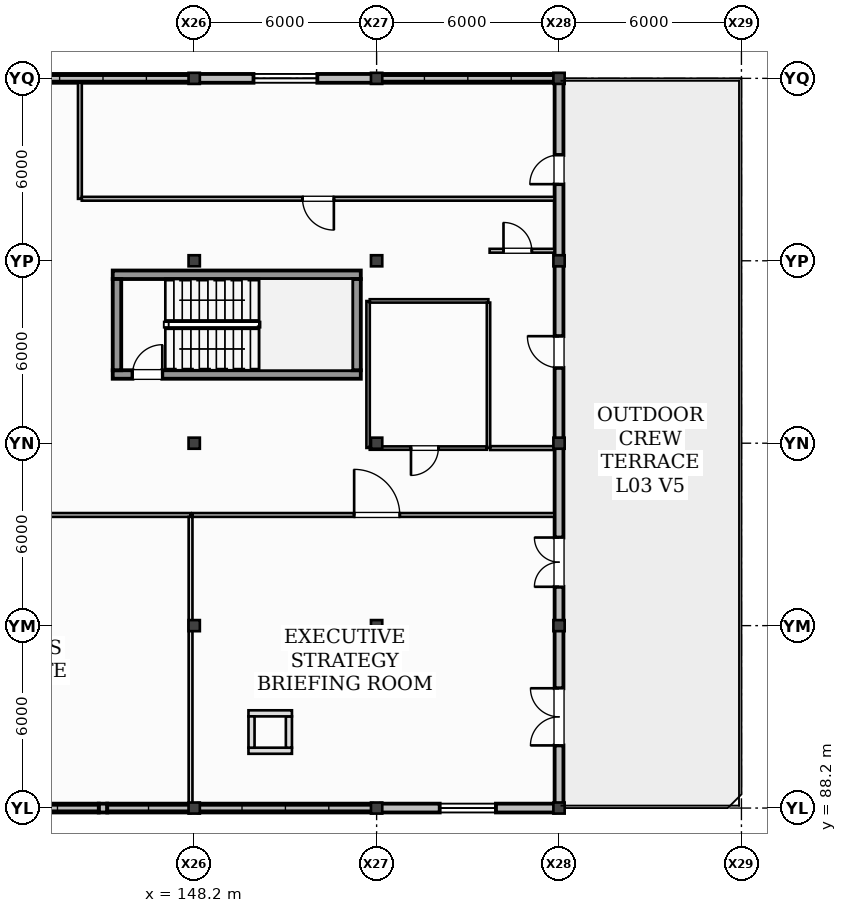
"""IFC4 building model, lengths in metres.
Left out: names, types, materials, properties, quantities, classifications, styles, units other than length and angle.
Written with IfcOpenShell. Run it as: python <this file> out.ifc"""

import sys

from ifc_helpers import new_model, si_unit, direction, frame, frame_2d, origin, origin_2d, place, context, subcontext, project, spatial, rectangle, i_section, extrude, element, fill, save


model = new_model("IFC4")
c1 = context("Model", 3, precision=1e-05, world=origin(), true_north=direction((0.0, 1.0)))
c2 = subcontext(c1, "Body", "Model", "MODEL_VIEW")
j1 = project(units=[si_unit("LENGTHUNIT", "METRE"), si_unit("PLANEANGLEUNIT", "RADIAN")], contexts=[c1])
p1 = place(None, origin())
s1 = spatial("IfcSite", under=j1, at=p1, CompositionType="ELEMENT")
p2 = place(p1, origin())
s2 = spatial("IfcBuilding", under=s1, at=p2, CompositionType="ELEMENT")
p3 = place(p2, frame((0.0, 0.0, 10.0)))
s3 = spatial("IfcBuildingStorey", under=s2, at=p3, CompositionType="ELEMENT", Elevation=10.0)
for number, where, z_axis, x_axis in (
    (1, (148.2, 88.2, 0.0), (0.0, 0.0, 1.0), (1.0, 0.0, 0.0)),
    (2, (148.2, 94.2, 0.0), (0.0, 0.0, 1.0), (1.0, 0.0, 0.0)),
    (3, (148.2, 100.2, 0.0), (0.0, 0.0, 1.0), (1.0, 0.0, 0.0)),
    (4, (148.2, 106.2, 0.0), (0.0, 0.0, 1.0), (1.0, 0.0, 0.0)),
    (5, (148.2, 112.2, 0.0), (0.0, 0.0, 1.0), (1.0, 0.0, 0.0)),
    (6, (154.2, 88.2, 0.0), (0.0, 0.0, 1.0), (1.0, 0.0, 0.0)),
    (7, (154.2, 94.2, 0.0), (0.0, 0.0, 1.0), (1.0, 0.0, 0.0)),
    (8, (154.2, 100.2, 0.0), (0.0, 0.0, 1.0), (1.0, 0.0, 0.0)),
    (9, (154.2, 106.2, 0.0), (0.0, 0.0, 1.0), (1.0, 0.0, 0.0)),
    (10, (154.2, 112.2, 0.0), (0.0, 0.0, 1.0), (1.0, 0.0, 0.0)),
    (11, (160.2, 88.2, 0.0), (0.0, 0.0, 1.0), (1.0, 0.0, 0.0)),
    (12, (160.2, 94.2, 0.0), (0.0, 0.0, 1.0), (1.0, 0.0, 0.0)),
    (13, (160.2, 100.2, 0.0), (0.0, 0.0, 1.0), (1.0, 0.0, 0.0)),
    (14, (160.2, 106.2, 0.0), (0.0, 0.0, 1.0), (1.0, 0.0, 0.0)),
    (15, (160.2, 112.2, 0.0), (0.0, 0.0, 1.0), (1.0, 0.0, 0.0)),
):
    element("IfcColumn", number, at=place(p3, frame(where, z_axis=z_axis, x_axis=x_axis)), inside=s3, PredefinedType="COLUMN", context=c2, shape_type="SweptSolid", body=[
        extrude(i_section(OverallWidth=0.371, OverallDepth=0.364, WebThickness=0.013, FlangeThickness=0.022, at=origin_2d()), origin(), (0.0, 0.0, 1.0), 4.0),
    ])
p4 = place(p3, frame((145.06, 88.2, 0.0), z_axis=(0.0, 0.0, 1.0), x_axis=(1.0, 0.0, 0.0)))
e16 = element("IfcWall", 16, at=p4, inside=s3, PredefinedType="STANDARD", context=c2, shape_type="SweptSolid", body=[
    extrude(rectangle(XDim=0.28, YDim=0.29, at=frame_2d((0.14, 0.0))), origin(), (0.0, 0.0, 1.0), 3.249),
])
p5 = place(p3, frame((142.345, 88.2, 0.0), z_axis=(0.0, 0.0, 1.0), x_axis=(1.0, 0.0, 0.0)))
e17 = element("IfcWall", 17, at=p5, inside=s3, PredefinedType="STANDARD", context=c2, shape_type="SweptSolid", body=[
    extrude(rectangle(XDim=2.715, YDim=0.29, at=frame_2d((1.357, 0.0))), origin(), (0.0, 0.0, 1.0), 0.68),
])
p6 = place(p3, frame((145.34, 88.2, 0.0), z_axis=(0.0, 0.0, 1.0), x_axis=(1.0, 0.0, 0.0)))
e18 = element("IfcWall", 18, at=p6, inside=s3, PredefinedType="STANDARD", context=c2, shape_type="SweptSolid", body=[
    extrude(rectangle(XDim=2.715, YDim=0.29, at=frame_2d((1.357, 0.0))), origin(), (0.0, 0.0, 1.0), 0.8),
])
p7 = place(p3, frame((148.345, 88.2, 0.0), z_axis=(0.0, 0.0, 1.0), x_axis=(1.0, 0.0, 0.0)))
e19 = element("IfcWall", 19, at=p7, inside=s3, PredefinedType="STANDARD", context=c2, shape_type="SweptSolid", body=[
    extrude(rectangle(XDim=5.71, YDim=0.29, at=frame_2d((2.855, 0.0))), origin(), (0.0, 0.0, 1.0), 0.92),
])
p8 = place(p3, frame((154.345, 88.2, 0.0), z_axis=(0.0, 0.0, 1.0), x_axis=(1.0, 0.0, 0.0)))
e20 = element("IfcWall", 20, at=p8, inside=s3, PredefinedType="STANDARD", context=c2, shape_type="SweptSolid", body=[
    extrude(rectangle(XDim=5.71, YDim=0.29, at=frame_2d((2.855, 0.0))), origin(), (0.0, 0.0, 1.0), 3.299),
])
p9 = place(p8, frame((1.93, 0.0, 1.0)))
e21 = element("IfcOpeningElement", 21, at=p9, cuts=e20, PredefinedType="OPENING", context=c2, shape_type="SweptSolid", body=[
    extrude(rectangle(XDim=1.85, YDim=1.55, at=frame_2d((0.925, 0.775))), frame((0.0, 0.155, 0.0), z_axis=(0.0, -1.0, 0.0), x_axis=(1.0, 0.0, 0.0)), (0.0, 0.0, 1.0), 0.31),
])
p10 = place(p3, frame((148.055, 112.2, 0.0), z_axis=(0.0, 0.0, 1.0), x_axis=(-1.0, 0.0, 0.0)))
e22 = element("IfcWall", 22, at=p10, inside=s3, PredefinedType="STANDARD", context=c2, shape_type="SweptSolid", body=[
    extrude(rectangle(XDim=5.71, YDim=0.29, at=frame_2d((2.855, 0.0))), origin(), (0.0, 0.0, 1.0), 0.68),
])
p11 = place(p3, frame((154.055, 112.2, 0.0), z_axis=(0.0, 0.0, 1.0), x_axis=(-1.0, 0.0, 0.0)))
e23 = element("IfcWall", 23, at=p11, inside=s3, PredefinedType="STANDARD", context=c2, shape_type="SweptSolid", body=[
    extrude(rectangle(XDim=5.71, YDim=0.29, at=frame_2d((2.855, 0.0))), origin(), (0.0, 0.0, 1.0), 3.249),
])
p12 = place(p11, frame((1.805, 0.0, 1.0)))
e24 = element("IfcOpeningElement", 24, at=p12, cuts=e23, PredefinedType="OPENING", context=c2, shape_type="SweptSolid", body=[
    extrude(rectangle(XDim=2.1, YDim=1.55, at=frame_2d((1.05, 0.775))), frame((0.0, 0.155, 0.0), z_axis=(0.0, -1.0, 0.0), x_axis=(1.0, 0.0, 0.0)), (0.0, 0.0, 1.0), 0.31),
])
p13 = place(p3, frame((160.055, 112.2, 0.0), z_axis=(0.0, 0.0, 1.0), x_axis=(-1.0, 0.0, 0.0)))
e25 = element("IfcWall", 25, at=p13, inside=s3, PredefinedType="STANDARD", context=c2, shape_type="SweptSolid", body=[
    extrude(rectangle(XDim=5.71, YDim=0.29, at=frame_2d((2.855, 0.0))), origin(), (0.0, 0.0, 1.0), 0.8),
])
p14 = place(p3, frame((160.2, 88.345, 0.0), z_axis=(0.0, 0.0, 1.0), x_axis=(0.0, 1.0, 0.0)))
e26 = element("IfcWall", 26, at=p14, inside=s3, PredefinedType="STANDARD", context=c2, shape_type="SweptSolid", body=[
    extrude(rectangle(XDim=5.71, YDim=0.29, at=frame_2d((2.855, 0.0))), origin(), (0.0, 0.0, 1.0), 3.303),
])
p15 = place(p14, frame((1.915, 0.0, 0.0)))
e27 = element("IfcOpeningElement", 27, at=p15, cuts=e26, PredefinedType="OPENING", context=c2, shape_type="SweptSolid", body=[
    extrude(rectangle(XDim=1.88, YDim=2.28, at=frame_2d((0.94, 1.14))), frame((0.0, 0.155, 0.0), z_axis=(0.0, -1.0, 0.0), x_axis=(1.0, 0.0, 0.0)), (0.0, 0.0, 1.0), 0.31),
])
p16 = place(p3, frame((160.2, 94.345, 0.0), z_axis=(0.0, 0.0, 1.0), x_axis=(0.0, 1.0, 0.0)))
e28 = element("IfcWall", 28, at=p16, inside=s3, PredefinedType="STANDARD", context=c2, shape_type="SweptSolid", body=[
    extrude(rectangle(XDim=5.71, YDim=0.29, at=frame_2d((2.855, 0.0))), origin(), (0.0, 0.0, 1.0), 3.303),
])
p17 = place(p16, frame((1.133, 0.0, 0.0)))
e29 = element("IfcOpeningElement", 29, at=p17, cuts=e28, PredefinedType="OPENING", context=c2, shape_type="SweptSolid", body=[
    extrude(rectangle(XDim=1.62, YDim=2.2, at=frame_2d((0.81, 1.1))), frame((0.0, 0.155, 0.0), z_axis=(0.0, -1.0, 0.0), x_axis=(1.0, 0.0, 0.0)), (0.0, 0.0, 1.0), 0.31),
])
p18 = place(p3, frame((160.2, 100.345, 0.0), z_axis=(0.0, 0.0, 1.0), x_axis=(0.0, 1.0, 0.0)))
e30 = element("IfcWall", 30, at=p18, inside=s3, PredefinedType="STANDARD", context=c2, shape_type="SweptSolid", body=[
    extrude(rectangle(XDim=5.71, YDim=0.29, at=frame_2d((2.855, 0.0))), origin(), (0.0, 0.0, 1.0), 3.303),
])
p19 = place(p18, frame((2.335, 0.0, 0.0)))
e31 = element("IfcOpeningElement", 31, at=p19, cuts=e30, PredefinedType="OPENING", context=c2, shape_type="SweptSolid", body=[
    extrude(rectangle(XDim=1.04, YDim=2.16, at=frame_2d((0.52, 1.08))), frame((0.0, 0.155, 0.0), z_axis=(0.0, -1.0, 0.0), x_axis=(1.0, 0.0, 0.0)), (0.0, 0.0, 1.0), 0.31),
])
p20 = place(p3, frame((160.2, 106.345, 0.0), z_axis=(0.0, 0.0, 1.0), x_axis=(0.0, 1.0, 0.0)))
e32 = element("IfcWall", 32, at=p20, inside=s3, PredefinedType="STANDARD", context=c2, shape_type="SweptSolid", body=[
    extrude(rectangle(XDim=5.71, YDim=0.29, at=frame_2d((2.855, 0.0))), origin(), (0.0, 0.0, 1.0), 3.303),
])
p21 = place(p20, frame((2.375, 0.0, 0.0)))
e33 = element("IfcOpeningElement", 33, at=p21, cuts=e32, PredefinedType="OPENING", context=c2, shape_type="SweptSolid", body=[
    extrude(rectangle(XDim=0.96, YDim=2.14, at=frame_2d((0.48, 1.07))), frame((0.0, 0.155, 0.0), z_axis=(0.0, -1.0, 0.0), x_axis=(1.0, 0.0, 0.0)), (0.0, 0.0, 1.0), 0.31),
])
p22 = place(p3, frame((145.52, 102.46, 0.0), z_axis=(0.0, 0.0, 1.0), x_axis=(1.0, 0.0, 0.0)))
e34 = element("IfcWall", 34, at=p22, inside=s3, PredefinedType="SHEAR", context=c2, shape_type="SweptSolid", body=[
    extrude(rectangle(XDim=8.16, YDim=0.28, at=frame_2d((4.08, 0.0))), origin(), (0.0, 0.0, 1.0), 4.0),
])
p23 = place(p22, frame((0.65, 0.0, 0.0)))
e35 = element("IfcOpeningElement", 35, at=p23, cuts=e34, PredefinedType="OPENING", context=c2, shape_type="SweptSolid", body=[
    extrude(rectangle(XDim=0.98, YDim=2.15, at=frame_2d((0.49, 1.075))), frame((0.0, 0.15, 0.0), z_axis=(0.0, -1.0, 0.0), x_axis=(1.0, 0.0, 0.0)), (0.0, 0.0, 1.0), 0.3),
])
p24 = place(p3, frame((153.68, 105.74, 0.0), z_axis=(0.0, 0.0, 1.0), x_axis=(-1.0, 0.0, 0.0)))
e36 = element("IfcWall", 36, at=p24, inside=s3, PredefinedType="SHEAR", context=c2, shape_type="SweptSolid", body=[
    extrude(rectangle(XDim=8.16, YDim=0.28, at=frame_2d((4.08, 0.0))), origin(), (0.0, 0.0, 1.0), 4.0),
])
for number, where, z_axis, x_axis in (
    (37, (145.66, 105.6, 0.0), (0.0, 0.0, 1.0), (0.0, -1.0, 0.0)),
    (38, (153.54, 102.6, 0.0), (0.0, 0.0, 1.0), (0.0, 1.0, 0.0)),
):
    element("IfcWall", number, at=place(p3, frame(where, z_axis=z_axis, x_axis=x_axis)), inside=s3, PredefinedType="SHEAR", context=c2, shape_type="SweptSolid", body=[
        extrude(rectangle(XDim=3.0, YDim=0.28, at=frame_2d((1.5, 0.0))), origin(), (0.0, 0.0, 1.0), 4.0),
    ])
p25 = place(p3, frame((149.985, 90.085, 0.0), z_axis=(0.0, 0.0, 1.0), x_axis=(1.0, 0.0, 0.0)))
e39 = element("IfcWall", 39, at=p25, inside=s3, PredefinedType="PARTITIONING", context=c2, shape_type="SweptSolid", body=[
    extrude(rectangle(XDim=1.43, YDim=0.2, at=frame_2d((0.715, 0.0))), origin(), (0.0, 0.0, 1.0), 3.74),
])
p26 = place(p3, frame((151.315, 90.185, 0.0), z_axis=(0.0, 0.0, 1.0), x_axis=(0.0, 1.0, 0.0)))
e40 = element("IfcWall", 40, at=p26, inside=s3, PredefinedType="PARTITIONING", context=c2, shape_type="SweptSolid", body=[
    extrude(rectangle(XDim=1.03, YDim=0.2, at=frame_2d((0.515, 0.0))), origin(), (0.0, 0.0, 1.0), 3.74),
])
p27 = place(p3, frame((151.415, 91.315, 0.0), z_axis=(0.0, 0.0, 1.0), x_axis=(-1.0, 0.0, 0.0)))
e41 = element("IfcWall", 41, at=p27, inside=s3, PredefinedType="PARTITIONING", context=c2, shape_type="SweptSolid", body=[
    extrude(rectangle(XDim=1.43, YDim=0.2, at=frame_2d((0.715, 0.0))), origin(), (0.0, 0.0, 1.0), 3.74),
])
p28 = place(p3, frame((150.085, 91.215, 0.0), z_axis=(0.0, 0.0, 1.0), x_axis=(0.0, -1.0, 0.0)))
e42 = element("IfcWall", 42, at=p28, inside=s3, PredefinedType="PARTITIONING", context=c2, shape_type="SweptSolid", body=[
    extrude(rectangle(XDim=1.03, YDim=0.2, at=frame_2d((0.515, 0.0))), origin(), (0.0, 0.0, 1.0), 3.45),
])
p29 = place(p3, frame((136.18, 97.84, 0.0), z_axis=(0.0, 0.0, 1.0), x_axis=(1.0, 0.0, 0.0)))
e43 = element("IfcWall", 43, at=p29, inside=s3, PredefinedType="PARTITIONING", context=c2, shape_type="SweptSolid", body=[
    extrude(rectangle(XDim=11.903, YDim=0.125, at=frame_2d((5.951, 0.0))), origin(), (0.0, 0.0, 1.0), 3.74),
])
p30 = place(p29, frame((5.472, 0.0, 0.0)))
e44 = element("IfcOpeningElement", 44, at=p30, cuts=e43, PredefinedType="OPENING", context=c2, shape_type="SweptSolid", body=[
    extrude(rectangle(XDim=1.18, YDim=2.16, at=frame_2d((0.59, 1.08))), frame((0.0, 0.073, 0.0), z_axis=(0.0, -1.0, 0.0), x_axis=(1.0, 0.0, 0.0)), (0.0, 0.0, 1.0), 0.145),
])
p31 = place(p3, frame((148.08, 97.778, 0.0), z_axis=(0.0, 0.0, 1.0), x_axis=(0.0, -1.0, 0.0)))
e45 = element("IfcWall", 45, at=p31, inside=s3, PredefinedType="PARTITIONING", context=c2, shape_type="SweptSolid", body=[
    extrude(rectangle(XDim=9.433, YDim=0.125, at=frame_2d((4.716, 0.0))), origin(), (0.0, 0.0, 1.0), 3.253),
])
p32 = place(p3, frame((148.143, 97.84, 0.0), z_axis=(0.0, 0.0, 1.0), x_axis=(1.0, 0.0, 0.0)))
e46 = element("IfcWall", 46, at=p32, inside=s3, PredefinedType="PARTITIONING", context=c2, shape_type="SweptSolid", body=[
    extrude(rectangle(XDim=11.912, YDim=0.125, at=frame_2d((5.956, 0.0))), origin(), (0.0, 0.0, 1.0), 3.74),
])
p33 = place(p32, frame((5.318, 0.0, 0.0)))
e47 = element("IfcOpeningElement", 47, at=p33, cuts=e46, PredefinedType="OPENING", context=c2, shape_type="SweptSolid", body=[
    extrude(rectangle(XDim=1.5, YDim=2.22, at=frame_2d((0.75, 1.11))), frame((0.0, 0.073, 0.0), z_axis=(0.0, -1.0, 0.0), x_axis=(1.0, 0.0, 0.0)), (0.0, 0.0, 1.0), 0.145),
])
p34 = place(p3, frame((144.44, 108.238, 0.0), z_axis=(0.0, 0.0, 1.0), x_axis=(0.0, 1.0, 0.0)))
e48 = element("IfcWall", 48, at=p34, inside=s3, PredefinedType="PARTITIONING", context=c2, shape_type="SweptSolid", body=[
    extrude(rectangle(XDim=3.817, YDim=0.125, at=frame_2d((1.909, 0.0))), origin(), (0.0, 0.0, 1.0), 3.45),
])
p35 = place(p3, frame((160.055, 108.24, 0.0), z_axis=(0.0, 0.0, 1.0), x_axis=(-1.0, 0.0, 0.0)))
e49 = element("IfcWall", 49, at=p35, inside=s3, PredefinedType="PARTITIONING", context=c2, shape_type="SweptSolid", body=[
    extrude(rectangle(XDim=15.552, YDim=0.125, at=frame_2d((7.776, 0.0))), origin(), (0.0, 0.0, 1.0), 3.74),
])
p36 = place(p35, frame((7.261, 0.0, 0.0)))
e50 = element("IfcOpeningElement", 50, at=p36, cuts=e49, PredefinedType="OPENING", context=c2, shape_type="SweptSolid", body=[
    extrude(rectangle(XDim=1.03, YDim=2.15, at=frame_2d((0.515, 1.075))), frame((0.0, 0.073, 0.0), z_axis=(0.0, -1.0, 0.0), x_axis=(1.0, 0.0, 0.0)), (0.0, 0.0, 1.0), 0.145),
])
p37 = place(p3, frame((153.92, 100.045, 0.0), z_axis=(0.0, 0.0, 1.0), x_axis=(0.0, 1.0, 0.0)))
e51 = element("IfcWall", 51, at=p37, inside=s3, PredefinedType="PARTITIONING", context=c2, shape_type="SweptSolid", body=[
    extrude(rectangle(XDim=4.83, YDim=0.11, at=frame_2d((2.415, 0.0))), origin(), (0.0, 0.0, 1.0), 3.253),
])
p38 = place(p3, frame((153.975, 104.88, 0.0), z_axis=(0.0, 0.0, 1.0), x_axis=(1.0, 0.0, 0.0)))
e52 = element("IfcWall", 52, at=p38, inside=s3, PredefinedType="PARTITIONING", context=c2, shape_type="SweptSolid", body=[
    extrude(rectangle(XDim=3.9, YDim=0.11, at=frame_2d((1.95, 0.0))), origin(), (0.0, 0.0, 1.0), 3.74),
])
p39 = place(p3, frame((157.88, 104.825, 0.0), z_axis=(0.0, 0.0, 1.0), x_axis=(0.0, -1.0, 0.0)))
e53 = element("IfcWall", 53, at=p39, inside=s3, PredefinedType="PARTITIONING", context=c2, shape_type="SweptSolid", body=[
    extrude(rectangle(XDim=4.78, YDim=0.11, at=frame_2d((2.39, 0.0))), origin(), (0.0, 0.0, 1.0), 3.404),
])
p40 = place(p3, frame((157.825, 100.04, 0.0), z_axis=(0.0, 0.0, 1.0), x_axis=(-1.0, 0.0, 0.0)))
e54 = element("IfcWall", 54, at=p40, inside=s3, PredefinedType="PARTITIONING", context=c2, shape_type="SweptSolid", body=[
    extrude(rectangle(XDim=3.85, YDim=0.11, at=frame_2d((1.925, 0.0))), origin(), (0.0, 0.0, 1.0), 3.299),
])
p41 = place(p40, frame((1.594, 0.0, 0.0)))
e55 = element("IfcOpeningElement", 55, at=p41, cuts=e54, PredefinedType="OPENING", context=c2, shape_type="SweptSolid", body=[
    extrude(rectangle(XDim=0.9, YDim=2.1, at=frame_2d((0.45, 1.05))), frame((0.0, 0.065, 0.0), z_axis=(0.0, -1.0, 0.0), x_axis=(1.0, 0.0, 0.0)), (0.0, 0.0, 1.0), 0.13),
])
p42 = place(p3, frame((157.917, 106.53, 0.0), z_axis=(0.0, 0.0, 1.0), x_axis=(1.0, 0.0, 0.0)))
e56 = element("IfcWall", 56, at=p42, inside=s3, PredefinedType="PARTITIONING", context=c2, shape_type="SweptSolid", body=[
    extrude(rectangle(XDim=2.137, YDim=0.125, at=frame_2d((1.069, 0.0))), origin(), (0.0, 0.0, 1.0), 3.299),
])
p43 = place(p42, frame((0.456, 0.0, 0.0)))
e57 = element("IfcOpeningElement", 57, at=p43, cuts=e56, PredefinedType="OPENING", context=c2, shape_type="SweptSolid", body=[
    extrude(rectangle(XDim=0.93, YDim=2.1, at=frame_2d((0.465, 1.05))), frame((0.0, 0.073, 0.0), z_axis=(0.0, -1.0, 0.0), x_axis=(1.0, 0.0, 0.0)), (0.0, 0.0, 1.0), 0.145),
])
p44 = place(p3, frame((160.055, 100.04, 0.0), z_axis=(0.0, 0.0, 1.0), x_axis=(-1.0, 0.0, 0.0)))
e58 = element("IfcWall", 58, at=p44, inside=s3, PredefinedType="PARTITIONING", context=c2, shape_type="SweptSolid", body=[
    extrude(rectangle(XDim=2.12, YDim=0.125, at=frame_2d((1.06, 0.0))), origin(), (0.0, 0.0, 1.0), 3.299),
])
p45 = place(p9, origin())
e59 = element("IfcWindow", 59, at=p45, inside=s3, PartitioningType="SINGLE_PANEL", PredefinedType="WINDOW", context=c2, shape_type="SweptSolid", body=[
    extrude(rectangle(XDim=1.85, YDim=1.55, at=frame_2d((0.925, 0.775))), frame((0.0, 0.03, 0.0), z_axis=(0.0, -1.0, 0.0), x_axis=(1.0, 0.0, 0.0)), (0.0, 0.0, 1.0), 0.06),
])
fill(e21, e59)
p46 = place(p12, origin())
e60 = element("IfcWindow", 60, at=p46, inside=s3, PartitioningType="SINGLE_PANEL", PredefinedType="WINDOW", context=c2, shape_type="SweptSolid", body=[
    extrude(rectangle(XDim=2.1, YDim=1.55, at=frame_2d((1.05, 0.775))), frame((0.0, 0.03, 0.0), z_axis=(0.0, -1.0, 0.0), x_axis=(1.0, 0.0, 0.0)), (0.0, 0.0, 1.0), 0.06),
])
fill(e24, e60)
p47 = place(p15, frame((1.88, 0.0, 0.0), z_axis=(0.0, 0.0, 1.0), x_axis=(-1.0, 0.0, 0.0)))
e61 = element("IfcDoor", 61, at=p47, inside=s3, OperationType="DOUBLE_DOOR_SINGLE_SWING", PredefinedType="DOOR", context=c2, shape_type="SweptSolid", body=[
    extrude(rectangle(XDim=1.88, YDim=2.28, at=frame_2d((0.94, 1.14))), frame((0.0, 0.025, 0.0), z_axis=(0.0, -1.0, 0.0), x_axis=(1.0, 0.0, 0.0)), (0.0, 0.0, 1.0), 0.05),
])
fill(e27, e61)
p48 = place(p17, frame((1.62, 0.0, 0.0), z_axis=(0.0, 0.0, 1.0), x_axis=(-1.0, 0.0, 0.0)))
e62 = element("IfcDoor", 62, at=p48, inside=s3, OperationType="DOUBLE_DOOR_SINGLE_SWING", PredefinedType="DOOR", context=c2, shape_type="SweptSolid", body=[
    extrude(rectangle(XDim=1.62, YDim=2.2, at=frame_2d((0.81, 1.1))), frame((0.0, 0.025, 0.0), z_axis=(0.0, -1.0, 0.0), x_axis=(1.0, 0.0, 0.0)), (0.0, 0.0, 1.0), 0.05),
])
fill(e29, e62)
p49 = place(p19, frame((1.04, 0.0, 0.0), z_axis=(0.0, 0.0, 1.0), x_axis=(-1.0, 0.0, 0.0)))
e63 = element("IfcDoor", 63, at=p49, inside=s3, OperationType="SINGLE_SWING_RIGHT", PredefinedType="DOOR", context=c2, shape_type="SweptSolid", body=[
    extrude(rectangle(XDim=1.04, YDim=2.16, at=frame_2d((0.52, 1.08))), frame((0.0, 0.025, 0.0), z_axis=(0.0, -1.0, 0.0), x_axis=(1.0, 0.0, 0.0)), (0.0, 0.0, 1.0), 0.05),
])
fill(e31, e63)
p50 = place(p21, frame((0.96, 0.0, 0.0), z_axis=(0.0, 0.0, 1.0), x_axis=(-1.0, 0.0, 0.0)))
e64 = element("IfcDoor", 64, at=p50, inside=s3, OperationType="SINGLE_SWING_LEFT", PredefinedType="DOOR", context=c2, shape_type="SweptSolid", body=[
    extrude(rectangle(XDim=0.96, YDim=2.14, at=frame_2d((0.48, 1.07))), frame((0.0, 0.025, 0.0), z_axis=(0.0, -1.0, 0.0), x_axis=(1.0, 0.0, 0.0)), (0.0, 0.0, 1.0), 0.05),
])
fill(e33, e64)
p51 = place(p23, origin())
e65 = element("IfcDoor", 65, at=p51, inside=s3, OperationType="SINGLE_SWING_RIGHT", PredefinedType="DOOR", context=c2, shape_type="SweptSolid", body=[
    extrude(rectangle(XDim=0.98, YDim=2.15, at=frame_2d((0.49, 1.075))), frame((0.0, 0.025, 0.0), z_axis=(0.0, -1.0, 0.0), x_axis=(1.0, 0.0, 0.0)), (0.0, 0.0, 1.0), 0.05),
])
fill(e35, e65)
p52 = place(p33, origin())
e66 = element("IfcDoor", 66, at=p52, inside=s3, OperationType="SINGLE_SWING_LEFT", PredefinedType="DOOR", context=c2, shape_type="SweptSolid", body=[
    extrude(rectangle(XDim=1.5, YDim=2.22, at=frame_2d((0.75, 1.11))), frame((0.0, 0.025, 0.0), z_axis=(0.0, -1.0, 0.0), x_axis=(1.0, 0.0, 0.0)), (0.0, 0.0, 1.0), 0.05),
])
fill(e47, e66)
p53 = place(p36, frame((1.03, 0.0, 0.0), z_axis=(0.0, 0.0, 1.0), x_axis=(-1.0, 0.0, 0.0)))
e67 = element("IfcDoor", 67, at=p53, inside=s3, OperationType="SINGLE_SWING_LEFT", PredefinedType="DOOR", context=c2, shape_type="SweptSolid", body=[
    extrude(rectangle(XDim=1.03, YDim=2.15, at=frame_2d((0.515, 1.075))), frame((0.0, 0.025, 0.0), z_axis=(0.0, -1.0, 0.0), x_axis=(1.0, 0.0, 0.0)), (0.0, 0.0, 1.0), 0.05),
])
fill(e50, e67)
p54 = place(p41, frame((0.9, 0.0, 0.0), z_axis=(0.0, 0.0, 1.0), x_axis=(-1.0, 0.0, 0.0)))
e68 = element("IfcDoor", 68, at=p54, inside=s3, OperationType="SINGLE_SWING_RIGHT", PredefinedType="DOOR", context=c2, shape_type="SweptSolid", body=[
    extrude(rectangle(XDim=0.9, YDim=2.1, at=frame_2d((0.45, 1.05))), frame((0.0, 0.025, 0.0), z_axis=(0.0, -1.0, 0.0), x_axis=(1.0, 0.0, 0.0)), (0.0, 0.0, 1.0), 0.05),
])
fill(e55, e68)
p55 = place(p43, frame((0.93, 0.0, 0.0), z_axis=(0.0, 0.0, 1.0), x_axis=(-1.0, 0.0, 0.0)))
e69 = element("IfcDoor", 69, at=p55, inside=s3, OperationType="SINGLE_SWING_LEFT", PredefinedType="DOOR", context=c2, shape_type="SweptSolid", body=[
    extrude(rectangle(XDim=0.93, YDim=2.1, at=frame_2d((0.465, 1.05))), frame((0.0, 0.025, 0.0), z_axis=(0.0, -1.0, 0.0), x_axis=(1.0, 0.0, 0.0)), (0.0, 0.0, 1.0), 0.05),
])
fill(e57, e69)
save(model, sys.argv[1])
